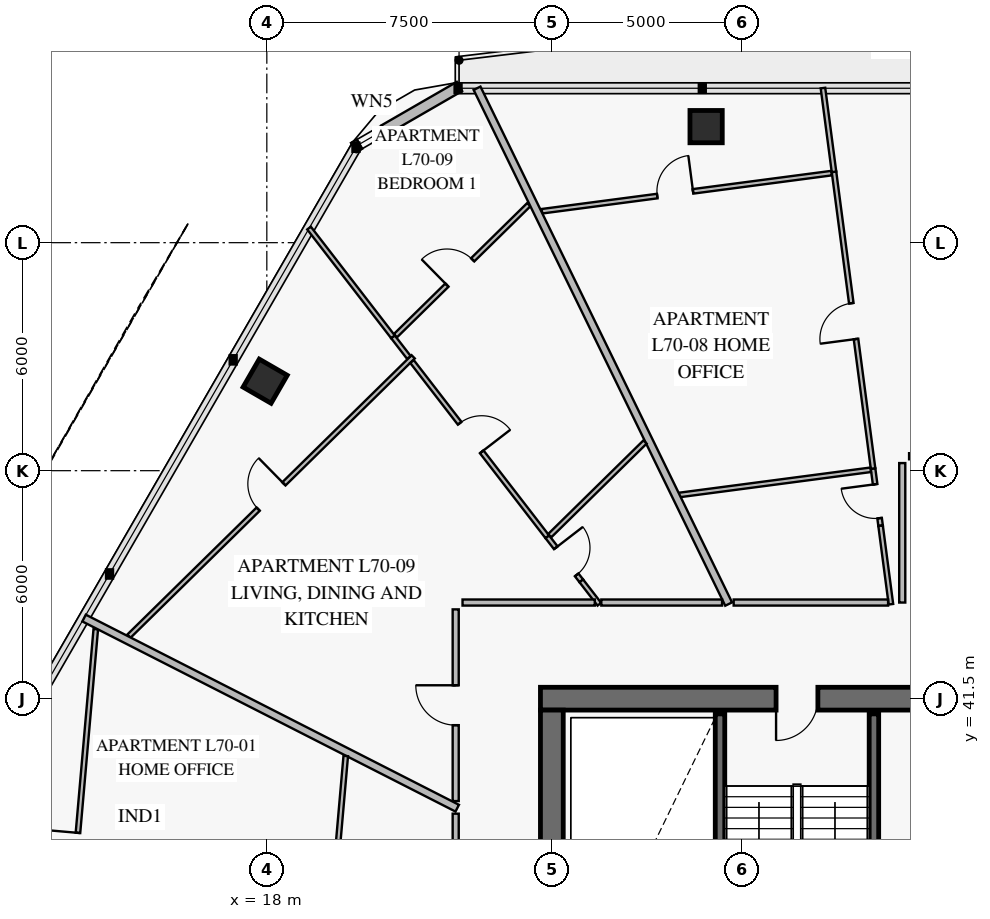
"""IFC4 building model, lengths in metres.
Left out: names, types, materials, properties, quantities, classifications, styles, units other than length and angle.
Written with IfcOpenShell. Run it as: python <this file> out.ifc"""

import sys

from ifc_helpers import new_model, si_unit, direction, frame, frame_2d, origin, origin_2d, place, context, subcontext, project, spatial, rectangle, extrude, element, fill, save


model = new_model("IFC4")
c1 = context("Model", 3, precision=1e-05, world=origin(), true_north=direction((0.0, 1.0)))
c2 = subcontext(c1, "Body", "Model", "MODEL_VIEW")
j1 = project(units=[si_unit("LENGTHUNIT", "METRE"), si_unit("PLANEANGLEUNIT", "RADIAN")], contexts=[c1])
p1 = place(None, origin())
s1 = spatial("IfcSite", under=j1, at=p1, CompositionType="ELEMENT")
p2 = place(p1, origin())
s2 = spatial("IfcBuilding", under=s1, at=p2, CompositionType="ELEMENT")
p3 = place(p2, frame((0.0, 0.0, 276.8)))
s3 = spatial("IfcBuildingStorey", under=s2, at=p3, CompositionType="ELEMENT", Elevation=276.8)
p4 = place(p3, frame((36.75, 41.5, 0.0), z_axis=(0.0, 0.0, 1.0), x_axis=(-1.0, 0.0, 0.0)))
e1 = element("IfcWall", 1, at=p4, inside=s3, PredefinedType="SHEAR", context=c2, shape_type="SweptSolid", body=[
    extrude(rectangle(XDim=11.55, YDim=0.6, at=frame_2d((5.775, 0.0))), origin(), (0.0, 0.0, 1.0), 3.8),
])
p5 = place(p4, frame((4.25, 0.0, 0.0)))
e2 = element("IfcOpeningElement", 2, at=p5, cuts=e1, PredefinedType="OPENING", context=c2, shape_type="SweptSolid", body=[
    extrude(rectangle(XDim=1.1, YDim=2.15, at=frame_2d((0.55, 1.075))), frame((0.0, 0.312, 0.0), z_axis=(0.0, -1.0, 0.0), x_axis=(1.0, 0.0, 0.0)), (0.0, 0.0, 1.0), 0.624),
])
p6 = place(p3, frame((25.5, 22.8, 0.0), z_axis=(0.0, 0.0, 1.0), x_axis=(0.0, 1.0, 0.0)))
e3 = element("IfcWall", 3, at=p6, inside=s3, PredefinedType="SHEAR", context=c2, shape_type="SweptSolid", body=[
    extrude(rectangle(XDim=18.4, YDim=0.6, at=frame_2d((9.2, 0.0))), origin(), (0.0, 0.0, 1.0), 3.8),
])
p7 = place(p6, frame((8.95, 0.0, 0.0)))
e4 = element("IfcOpeningElement", 4, at=p7, cuts=e3, PredefinedType="OPENING", context=c2, shape_type="SweptSolid", body=[
    extrude(rectangle(XDim=1.1, YDim=2.15, at=frame_2d((0.55, 1.075))), frame((0.0, 0.312, 0.0), z_axis=(0.0, -1.0, 0.0), x_axis=(1.0, 0.0, 0.0)), (0.0, 0.0, 1.0), 0.624),
])
for number, where, z_axis, x_axis in (
    (5, (29.559, 56.554, 0.0), (0.0, 0.0, 1.0), (-1.0, 0.0, 0.0)),
    (6, (17.956, 49.855, 0.0), (0.0, 0.0, 1.0), (-0.5, -0.866, 0.0)),
):
    element("IfcColumn", number, at=place(p3, frame(where, z_axis=z_axis, x_axis=x_axis)), inside=s3, PredefinedType="COLUMN", context=c2, shape_type="SweptSolid", body=[
        extrude(rectangle(XDim=0.85, YDim=0.85, at=origin_2d()), origin(), (0.0, 0.0, 1.0), 3.55),
    ])
p8 = place(p3, frame((20.285, 56.004, 0.0), z_axis=(0.0, 0.0, 1.0), x_axis=(0.866028773314, 0.499994163758, 0.0)))
e7 = element("IfcWall", 7, at=p8, inside=s3, PredefinedType="SOLIDWALL", context=c2, shape_type="SweptSolid", body=[
    extrude(rectangle(XDim=3.215, YDim=0.28, at=frame_2d((1.607, 0.0))), origin(), (0.0, 0.0, 1.0), 3.55),
])
p9 = place(p8, frame((0.176, 0.0, 0.85)))
e8 = element("IfcOpeningElement", 8, at=p9, cuts=e7, PredefinedType="OPENING", context=c2, shape_type="SweptSolid", body=[
    extrude(rectangle(XDim=0.75, YDim=1.5, at=frame_2d((0.375, 0.75))), frame((0.0, 0.152, 0.0), z_axis=(0.0, -1.0, 0.0), x_axis=(1.0, 0.0, 0.0)), (0.0, 0.0, 1.0), 0.304),
])
for number, where, z_axis, x_axis in (
    (9, (29.925, 31.4, 0.0), (0.0, 0.0, 1.0), (0.0, 1.0, 0.0)),
    (10, (33.975, 31.4, 0.0), (0.0, 0.0, 1.0), (0.0, 1.0, 0.0)),
):
    element("IfcWall", number, at=place(p3, frame(where, z_axis=z_axis, x_axis=x_axis)), inside=s3, PredefinedType="SOLIDWALL", context=c2, shape_type="SweptSolid", body=[
        extrude(rectangle(XDim=9.7, YDim=0.25, at=frame_2d((4.85, 0.0))), origin(), (0.0, 0.0, 1.0), 3.8),
    ])
p10 = place(p3, frame((13.5, 43.33, 0.0), z_axis=(0.0, 0.0, 1.0), x_axis=(-0.087173732825, -0.996193124, 0.0)))
e11 = element("IfcWall", 11, at=p10, inside=s3, PredefinedType="PARTITIONING", context=c2, shape_type="SweptSolid", body=[
    extrude(rectangle(XDim=7.144, YDim=0.12, at=frame_2d((3.572, 0.0))), origin(), (0.0, 0.0, 1.0), 2.93),
])
p11 = place(p10, frame((5.382, 0.0, 0.0)))
e12 = element("IfcOpeningElement", 12, at=p11, cuts=e11, PredefinedType="OPENING", context=c2, shape_type="SweptSolid", body=[
    extrude(rectangle(XDim=0.95, YDim=2.1, at=frame_2d((0.475, 1.05))), frame((0.0, 0.072, 0.0), z_axis=(0.0, -1.0, 0.0), x_axis=(1.0, 0.0, 0.0)), (0.0, 0.0, 1.0), 0.144),
])
p12 = place(p3, frame((34.15, 46.052, 0.0), z_axis=(0.0, 0.0, 1.0), x_axis=(-0.130446191053, 0.991455390444, 0.0)))
e13 = element("IfcWall", 13, at=p12, inside=s3, PredefinedType="PARTITIONING", context=c2, shape_type="SweptSolid", body=[
    extrude(rectangle(XDim=1.518, YDim=0.12, at=frame_2d((0.759, 0.0))), origin(), (0.0, 0.0, 1.0), 3.55),
])
p13 = place(p12, frame((0.2, 0.0, 0.0)))
e14 = element("IfcOpeningElement", 14, at=p13, cuts=e13, PredefinedType="OPENING", context=c2, shape_type="SweptSolid", body=[
    extrude(rectangle(XDim=0.9, YDim=2.1, at=frame_2d((0.45, 1.05))), frame((0.0, 0.072, 0.0), z_axis=(0.0, -1.0, 0.0), x_axis=(1.0, 0.0, 0.0)), (0.0, 0.0, 1.0), 0.144),
])
p14 = place(p3, frame((33.952, 47.557, 0.0), z_axis=(0.0, 0.0, 1.0), x_axis=(-0.130526693002, 0.991444795444, 0.0)))
e15 = element("IfcWall", 15, at=p14, inside=s3, PredefinedType="PARTITIONING", context=c2, shape_type="SweptSolid", body=[
    extrude(rectangle(XDim=7.875, YDim=0.12, at=frame_2d((3.937, 0.0))), origin(), (0.0, 0.0, 1.0), 3.15),
])
p15 = place(p14, frame((3.437, 0.0, 0.0)))
e16 = element("IfcOpeningElement", 16, at=p15, cuts=e15, PredefinedType="OPENING", context=c2, shape_type="SweptSolid", body=[
    extrude(rectangle(XDim=0.95, YDim=2.1, at=frame_2d((0.475, 1.05))), frame((0.0, 0.072, 0.0), z_axis=(0.0, -1.0, 0.0), x_axis=(1.0, 0.0, 0.0)), (0.0, 0.0, 1.0), 0.144),
])
p16 = place(p3, frame((32.86, 55.33, 0.0), z_axis=(0.0, 0.0, 1.0), x_axis=(-0.991445968749, -0.130517780591, 0.0)))
e17 = element("IfcWall", 17, at=p16, inside=s3, PredefinedType="PARTITIONING", context=c2, shape_type="SweptSolid", body=[
    extrude(rectangle(XDim=7.686, YDim=0.12, at=frame_2d((3.843, 0.0))), origin(), (0.0, 0.0, 1.0), 2.93),
])
p17 = place(p16, frame((3.677, 0.0, 0.0)))
e18 = element("IfcOpeningElement", 18, at=p17, cuts=e17, PredefinedType="OPENING", context=c2, shape_type="SweptSolid", body=[
    extrude(rectangle(XDim=0.95, YDim=2.1, at=frame_2d((0.475, 1.05))), frame((0.0, 0.072, 0.0), z_axis=(0.0, -1.0, 0.0), x_axis=(1.0, 0.0, 0.0)), (0.0, 0.0, 1.0), 0.144),
])
p18 = place(p3, frame((21.851, 50.496, 0.0), z_axis=(0.0, 0.0, 1.0), x_axis=(-0.713249440672, -0.700910290537, 0.0)))
e19 = element("IfcWall", 19, at=p18, inside=s3, PredefinedType="PARTITIONING", context=c2, shape_type="SweptSolid", body=[
    extrude(rectangle(XDim=10.487, YDim=0.12, at=frame_2d((5.243, 0.0))), origin(), (0.0, 0.0, 1.0), 2.95),
])
p19 = place(p18, frame((4.768, 0.0, 0.0)))
e20 = element("IfcOpeningElement", 20, at=p19, cuts=e19, PredefinedType="OPENING", context=c2, shape_type="SweptSolid", body=[
    extrude(rectangle(XDim=0.95, YDim=2.1, at=frame_2d((0.475, 1.05))), frame((0.0, 0.072, 0.0), z_axis=(0.0, -1.0, 0.0), x_axis=(1.0, 0.0, 0.0)), (0.0, 0.0, 1.0), 0.144),
])
p20 = place(p3, frame((26.276, 44.6, 0.0), z_axis=(0.0, 0.0, 1.0), x_axis=(-0.611021070932, 0.791614332158, 0.0)))
e21 = element("IfcWall", 21, at=p20, inside=s3, PredefinedType="PARTITIONING", context=c2, shape_type="SweptSolid", body=[
    extrude(rectangle(XDim=1.467, YDim=0.12, at=frame_2d((0.733, 0.0))), origin(), (0.0, 0.0, 1.0), 3.55),
])
p21 = place(p20, frame((0.2, 0.0, 0.0)))
e22 = element("IfcOpeningElement", 22, at=p21, cuts=e21, PredefinedType="OPENING", context=c2, shape_type="SweptSolid", body=[
    extrude(rectangle(XDim=0.9, YDim=2.1, at=frame_2d((0.45, 1.05))), frame((0.0, 0.072, 0.0), z_axis=(0.0, -1.0, 0.0), x_axis=(1.0, 0.0, 0.0)), (0.0, 0.0, 1.0), 0.144),
])
p22 = place(p3, frame((25.379, 45.761, 0.0), z_axis=(0.0, 0.0, 1.0), x_axis=(-0.610990418686, 0.791637990671, 0.0)))
e23 = element("IfcWall", 23, at=p22, inside=s3, PredefinedType="PARTITIONING", context=c2, shape_type="SweptSolid", body=[
    extrude(rectangle(XDim=5.823, YDim=0.12, at=frame_2d((2.912, 0.0))), origin(), (0.0, 0.0, 1.0), 3.55),
])
p23 = place(p22, frame((2.823, 0.0, 0.0)))
e24 = element("IfcOpeningElement", 24, at=p23, cuts=e23, PredefinedType="OPENING", context=c2, shape_type="SweptSolid", body=[
    extrude(rectangle(XDim=0.95, YDim=2.1, at=frame_2d((0.475, 1.05))), frame((0.0, 0.072, 0.0), z_axis=(0.0, -1.0, 0.0), x_axis=(1.0, 0.0, 0.0)), (0.0, 0.0, 1.0), 0.144),
])
p24 = place(p3, frame((21.738, 50.48, 0.0), z_axis=(0.0, 0.0, 1.0), x_axis=(-0.611052177593, 0.791590320973, 0.0)))
e25 = element("IfcWall", 25, at=p24, inside=s3, PredefinedType="PARTITIONING", context=c2, shape_type="SweptSolid", body=[
    extrude(rectangle(XDim=0.686, YDim=0.12, at=frame_2d((0.343, 0.0))), origin(), (0.0, 0.0, 1.0), 3.55),
])
p25 = place(p3, frame((24.894, 54.5, 0.0), z_axis=(0.0, 0.0, 1.0), x_axis=(-0.713280305257, -0.700878881214, 0.0)))
e26 = element("IfcWall", 26, at=p25, inside=s3, PredefinedType="PARTITIONING", context=c2, shape_type="SweptSolid", body=[
    extrude(rectangle(XDim=4.922, YDim=0.12, at=frame_2d((2.461, 0.0))), origin(), (0.0, 0.0, 1.0), 2.93),
])
p26 = place(p25, frame((2.07, 0.0, 0.0)))
e27 = element("IfcOpeningElement", 27, at=p26, cuts=e26, PredefinedType="OPENING", context=c2, shape_type="SweptSolid", body=[
    extrude(rectangle(XDim=0.95, YDim=2.1, at=frame_2d((0.475, 1.05))), frame((0.0, 0.072, 0.0), z_axis=(0.0, -1.0, 0.0), x_axis=(1.0, 0.0, 0.0)), (0.0, 0.0, 1.0), 0.144),
])
p27 = place(p3, frame((22.97, 43.85, 0.0), z_axis=(0.0, 0.0, 1.0), x_axis=(0.0, -1.0, 0.0)))
e28 = element("IfcWall", 28, at=p27, inside=s3, PredefinedType="PARTITIONING", context=c2, shape_type="SweptSolid", body=[
    extrude(rectangle(XDim=5.045, YDim=0.16, at=frame_2d((2.522, 0.0))), origin(), (0.0, 0.0, 1.0), 3.55),
])
p28 = place(p27, frame((1.997, 0.0, 0.0)))
e29 = element("IfcOpeningElement", 29, at=p28, cuts=e28, PredefinedType="OPENING", context=c2, shape_type="SweptSolid", body=[
    extrude(rectangle(XDim=1.05, YDim=2.15, at=frame_2d((0.525, 1.075))), frame((0.0, 0.092, 0.0), z_axis=(0.0, -1.0, 0.0), x_axis=(1.0, 0.0, 0.0)), (0.0, 0.0, 1.0), 0.184),
])
p29 = place(p3, frame((23.01, 38.619, 0.0), z_axis=(0.0, 0.0, 1.0), x_axis=(-0.891002805017, 0.453997798951, 0.0)))
e30 = element("IfcWall", 30, at=p29, inside=s3, PredefinedType="PARTITIONING", context=c2, shape_type="SweptSolid", body=[
    extrude(rectangle(XDim=11.02, YDim=0.2, at=frame_2d((5.51, 0.0))), origin(), (0.0, 0.0, 1.0), 2.93),
])
p30 = place(p3, frame((20.077, 39.992, 0.0), z_axis=(0.0, 0.0, 1.0), x_axis=(-0.087174203927, -0.996193082775, 0.0)))
e31 = element("IfcWall", 31, at=p30, inside=s3, PredefinedType="PARTITIONING", context=c2, shape_type="SweptSolid", body=[
    extrude(rectangle(XDim=5.01, YDim=0.12, at=frame_2d((2.505, 0.0))), origin(), (0.0, 0.0, 1.0), 2.95),
])
p31 = place(p3, frame((34.422, 43.985, 0.0), z_axis=(0.0, 0.0, 1.0), x_axis=(-0.13057568554, 0.991438344198, 0.0)))
e32 = element("IfcWall", 32, at=p31, inside=s3, PredefinedType="PARTITIONING", context=c2, shape_type="SweptSolid", body=[
    extrude(rectangle(XDim=2.085, YDim=0.12, at=frame_2d((1.042, 0.0))), origin(), (0.0, 0.0, 1.0), 3.55),
])
p32 = place(p3, frame((32.924, 55.364, 0.0), z_axis=(0.0, 0.0, 1.0), x_axis=(-0.130545396872, 0.991442332844, 0.0)))
e33 = element("IfcWall", 33, at=p32, inside=s3, PredefinedType="PARTITIONING", context=c2, shape_type="SweptSolid", body=[
    extrude(rectangle(XDim=2.224, YDim=0.12, at=frame_2d((1.112, 0.0))), origin(), (0.0, 0.0, 1.0), 2.93),
])
p33 = place(p3, frame((33.888, 47.523, 0.0), z_axis=(0.0, 0.0, 1.0), x_axis=(-0.991446514555, -0.130513634444, 0.0)))
e34 = element("IfcWall", 34, at=p33, inside=s3, PredefinedType="PARTITIONING", context=c2, shape_type="SweptSolid", body=[
    extrude(rectangle(XDim=5.127, YDim=0.12, at=frame_2d((2.564, 0.0))), origin(), (0.0, 0.0, 1.0), 2.95),
])
p34 = place(p3, frame((30.152, 43.99, 0.0), z_axis=(0.0, 0.0, 1.0), x_axis=(-0.438371715405, 0.898793768967, 0.0)))
e35 = element("IfcWall", 35, at=p34, inside=s3, PredefinedType="PARTITIONING", context=c2, shape_type="SweptSolid", body=[
    extrude(rectangle(XDim=15.102, YDim=0.2, at=frame_2d((7.551, 0.0))), origin(), (0.0, 0.0, 1.0), 2.93),
])
p35 = place(p3, frame((26.75, 43.985, 0.0), z_axis=(0.0, 0.0, 1.0), x_axis=(-0.610955434965, 0.79166499006, 0.0)))
e36 = element("IfcWall", 36, at=p35, inside=s3, PredefinedType="PARTITIONING", context=c2, shape_type="SweptSolid", body=[
    extrude(rectangle(XDim=0.777, YDim=0.12, at=frame_2d((0.388, 0.0))), origin(), (0.0, 0.0, 1.0), 3.55),
])
p36 = place(p3, frame((21.319, 51.023, 0.0), z_axis=(0.0, 0.0, 1.0), x_axis=(-0.610999451225, 0.791631019227, 0.0)))
e37 = element("IfcWall", 37, at=p36, inside=s3, PredefinedType="PARTITIONING", context=c2, shape_type="SweptSolid", body=[
    extrude(rectangle(XDim=3.614, YDim=0.12, at=frame_2d((1.807, 0.0))), origin(), (0.0, 0.0, 1.0), 2.93),
])
p37 = place(p3, frame((27.952, 48.254, 0.0), z_axis=(0.0, 0.0, 1.0), x_axis=(-0.713223784255, -0.700936397666, 0.0)))
e38 = element("IfcWall", 38, at=p37, inside=s3, PredefinedType="PARTITIONING", context=c2, shape_type="SweptSolid", body=[
    extrude(rectangle(XDim=3.517, YDim=0.12, at=frame_2d((1.758, 0.0))), origin(), (0.0, 0.0, 1.0), 3.55),
])
p38 = place(p3, frame((22.97, 38.474, 0.0), z_axis=(0.0, 0.0, 1.0), x_axis=(0.0, -1.0, 0.0)))
e39 = element("IfcWall", 39, at=p38, inside=s3, PredefinedType="PARTITIONING", context=c2, shape_type="SweptSolid", body=[
    extrude(rectangle(XDim=4.07, YDim=0.16, at=frame_2d((2.035, 0.0))), origin(), (0.0, 0.0, 1.0), 2.95),
])
p39 = place(p3, frame((34.72, 47.7, 0.0), z_axis=(0.0, 0.0, 1.0), x_axis=(0.0, -1.0, 0.0)))
e40 = element("IfcWall", 40, at=p39, inside=s3, PredefinedType="PARTITIONING", context=c2, shape_type="SweptSolid", body=[
    extrude(rectangle(XDim=3.67, YDim=0.16, at=frame_2d((1.835, 0.0))), origin(), (0.0, 0.0, 1.0), 3.55),
])
p40 = place(p3, frame((37.1, 47.88, 0.0), z_axis=(0.0, 0.0, 1.0), x_axis=(-1.0, 0.0, 0.0)))
e41 = element("IfcWall", 41, at=p40, inside=s3, PredefinedType="PARTITIONING", context=c2, shape_type="SweptSolid", body=[
    extrude(rectangle(XDim=2.2, YDim=0.16, at=frame_2d((1.1, 0.0))), origin(), (0.0, 0.0, 1.0), 3.55),
])
p41 = place(p3, frame((34.348, 44.03, 0.0), z_axis=(0.0, 0.0, 1.0), x_axis=(-1.0, 0.0, 0.0)))
e42 = element("IfcWall", 42, at=p41, inside=s3, PredefinedType="PARTITIONING", context=c2, shape_type="SweptSolid", body=[
    extrude(rectangle(XDim=4.063, YDim=0.16, at=frame_2d((2.032, 0.0))), origin(), (0.0, 0.0, 1.0), 2.95),
])
p42 = place(p3, frame((26.63, 44.03, 0.0), z_axis=(0.0, 0.0, 1.0), x_axis=(-1.0, 0.0, 0.0)))
e43 = element("IfcWall", 43, at=p42, inside=s3, PredefinedType="PARTITIONING", context=c2, shape_type="SweptSolid", body=[
    extrude(rectangle(XDim=3.48, YDim=0.16, at=frame_2d((1.74, 0.0))), origin(), (0.0, 0.0, 1.0), 2.95),
])
p43 = place(p3, frame((29.98, 44.03, 0.0), z_axis=(0.0, 0.0, 1.0), x_axis=(-1.0, 0.0, 0.0)))
e44 = element("IfcWall", 44, at=p43, inside=s3, PredefinedType="PARTITIONING", context=c2, shape_type="SweptSolid", body=[
    extrude(rectangle(XDim=3.178, YDim=0.16, at=frame_2d((1.589, 0.0))), origin(), (0.0, 0.0, 1.0), 3.55),
])
p44 = place(p9, origin())
e45 = element("IfcWindow", 45, at=p44, inside=s3, PartitioningType="SINGLE_PANEL", PredefinedType="WINDOW", context=c2, shape_type="SweptSolid", body=[
    extrude(rectangle(XDim=0.75, YDim=1.5, at=frame_2d((0.375, 0.75))), frame((0.0, 0.03, 0.0), z_axis=(0.0, -1.0, 0.0), x_axis=(1.0, 0.0, 0.0)), (0.0, 0.0, 1.0), 0.06),
])
fill(e8, e45)
p45 = place(p5, origin())
e46 = element("IfcDoor", 46, at=p45, inside=s3, OperationType="SINGLE_SWING_RIGHT", PredefinedType="USERDEFINED", context=c2, shape_type="SweptSolid", body=[
    extrude(rectangle(XDim=1.1, YDim=2.15, at=frame_2d((0.55, 1.075))), frame((0.0, 0.025, 0.0), z_axis=(0.0, -1.0, 0.0), x_axis=(1.0, 0.0, 0.0)), (0.0, 0.0, 1.0), 0.05),
])
fill(e2, e46)
p46 = place(p11, frame((0.95, 0.0, 0.0), z_axis=(0.0, 0.0, 1.0), x_axis=(-1.0, 0.0, 0.0)))
e47 = element("IfcDoor", 47, at=p46, inside=s3, OperationType="SINGLE_SWING_RIGHT", PredefinedType="DOOR", context=c2, shape_type="SweptSolid", body=[
    extrude(rectangle(XDim=0.95, YDim=2.1, at=frame_2d((0.475, 1.05))), frame((0.0, 0.025, 0.0), z_axis=(0.0, -1.0, 0.0), x_axis=(1.0, 0.0, 0.0)), (0.0, 0.0, 1.0), 0.05),
])
fill(e12, e47)
p47 = place(p13, origin())
e48 = element("IfcDoor", 48, at=p47, inside=s3, OperationType="SINGLE_SWING_RIGHT", PredefinedType="DOOR", context=c2, shape_type="SweptSolid", body=[
    extrude(rectangle(XDim=0.9, YDim=2.1, at=frame_2d((0.45, 1.05))), frame((0.0, 0.025, 0.0), z_axis=(0.0, -1.0, 0.0), x_axis=(1.0, 0.0, 0.0)), (0.0, 0.0, 1.0), 0.05),
])
fill(e14, e48)
p48 = place(p15, origin())
e49 = element("IfcDoor", 49, at=p48, inside=s3, OperationType="SINGLE_SWING_LEFT", PredefinedType="DOOR", context=c2, shape_type="SweptSolid", body=[
    extrude(rectangle(XDim=0.95, YDim=2.1, at=frame_2d((0.475, 1.05))), frame((0.0, 0.025, 0.0), z_axis=(0.0, -1.0, 0.0), x_axis=(1.0, 0.0, 0.0)), (0.0, 0.0, 1.0), 0.05),
])
fill(e16, e49)
p49 = place(p17, frame((0.95, 0.0, 0.0), z_axis=(0.0, 0.0, 1.0), x_axis=(-1.0, 0.0, 0.0)))
e50 = element("IfcDoor", 50, at=p49, inside=s3, OperationType="SINGLE_SWING_RIGHT", PredefinedType="DOOR", context=c2, shape_type="SweptSolid", body=[
    extrude(rectangle(XDim=0.95, YDim=2.1, at=frame_2d((0.475, 1.05))), frame((0.0, 0.025, 0.0), z_axis=(0.0, -1.0, 0.0), x_axis=(1.0, 0.0, 0.0)), (0.0, 0.0, 1.0), 0.05),
])
fill(e18, e50)
p50 = place(p19, frame((0.95, 0.0, 0.0), z_axis=(0.0, 0.0, 1.0), x_axis=(-1.0, 0.0, 0.0)))
e51 = element("IfcDoor", 51, at=p50, inside=s3, OperationType="SINGLE_SWING_RIGHT", PredefinedType="DOOR", context=c2, shape_type="SweptSolid", body=[
    extrude(rectangle(XDim=0.95, YDim=2.1, at=frame_2d((0.475, 1.05))), frame((0.0, 0.025, 0.0), z_axis=(0.0, -1.0, 0.0), x_axis=(1.0, 0.0, 0.0)), (0.0, 0.0, 1.0), 0.05),
])
fill(e20, e51)
p51 = place(p21, frame((0.9, 0.0, 0.0), z_axis=(0.0, 0.0, 1.0), x_axis=(-1.0, 0.0, 0.0)))
e52 = element("IfcDoor", 52, at=p51, inside=s3, OperationType="SINGLE_SWING_LEFT", PredefinedType="DOOR", context=c2, shape_type="SweptSolid", body=[
    extrude(rectangle(XDim=0.9, YDim=2.1, at=frame_2d((0.45, 1.05))), frame((0.0, 0.025, 0.0), z_axis=(0.0, -1.0, 0.0), x_axis=(1.0, 0.0, 0.0)), (0.0, 0.0, 1.0), 0.05),
])
fill(e22, e52)
p52 = place(p23, frame((0.95, 0.0, 0.0), z_axis=(0.0, 0.0, 1.0), x_axis=(-1.0, 0.0, 0.0)))
e53 = element("IfcDoor", 53, at=p52, inside=s3, OperationType="SINGLE_SWING_RIGHT", PredefinedType="DOOR", context=c2, shape_type="SweptSolid", body=[
    extrude(rectangle(XDim=0.95, YDim=2.1, at=frame_2d((0.475, 1.05))), frame((0.0, 0.025, 0.0), z_axis=(0.0, -1.0, 0.0), x_axis=(1.0, 0.0, 0.0)), (0.0, 0.0, 1.0), 0.05),
])
fill(e24, e53)
p53 = place(p26, frame((0.95, 0.0, 0.0), z_axis=(0.0, 0.0, 1.0), x_axis=(-1.0, 0.0, 0.0)))
e54 = element("IfcDoor", 54, at=p53, inside=s3, OperationType="SINGLE_SWING_LEFT", PredefinedType="DOOR", context=c2, shape_type="SweptSolid", body=[
    extrude(rectangle(XDim=0.95, YDim=2.1, at=frame_2d((0.475, 1.05))), frame((0.0, 0.025, 0.0), z_axis=(0.0, -1.0, 0.0), x_axis=(1.0, 0.0, 0.0)), (0.0, 0.0, 1.0), 0.05),
])
fill(e27, e54)
p54 = place(p28, frame((1.05, 0.0, 0.0), z_axis=(0.0, 0.0, 1.0), x_axis=(-1.0, 0.0, 0.0)))
e55 = element("IfcDoor", 55, at=p54, inside=s3, OperationType="SINGLE_SWING_RIGHT", PredefinedType="DOOR", context=c2, shape_type="SweptSolid", body=[
    extrude(rectangle(XDim=1.05, YDim=2.15, at=frame_2d((0.525, 1.075))), frame((0.0, 0.025, 0.0), z_axis=(0.0, -1.0, 0.0), x_axis=(1.0, 0.0, 0.0)), (0.0, 0.0, 1.0), 0.05),
])
fill(e29, e55)
save(model, sys.argv[1])
